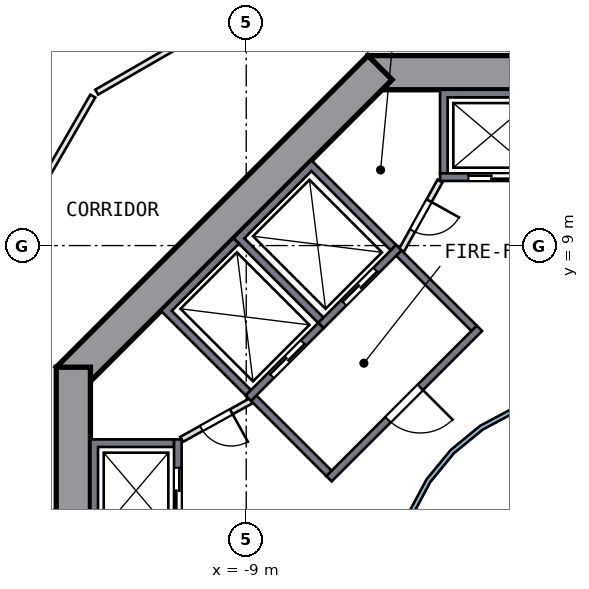
"""IFC4 building model, lengths in metres.
Left out: names, types, materials, properties, quantities, classifications, styles, units other than length and angle.
Written with IfcOpenShell. Run it as: python <this file> out.ifc"""

import sys

from ifc_helpers import new_model, si_unit, direction, frame, frame_2d, origin, place, context, subcontext, project, spatial, polyline, rectangle, outline, extrude, element, fill, save


model = new_model("IFC4")
c1 = context("Model", 3, precision=1e-05, world=origin(), true_north=direction((0.0, 1.0)))
c2 = subcontext(c1, "Body", "Model", "MODEL_VIEW")
j1 = project(units=[si_unit("LENGTHUNIT", "METRE"), si_unit("PLANEANGLEUNIT", "RADIAN")], contexts=[c1])
p1 = place(None, origin())
s1 = spatial("IfcSite", under=j1, at=p1, CompositionType="ELEMENT")
p2 = place(p1, origin())
s2 = spatial("IfcBuilding", under=s1, at=p2, CompositionType="ELEMENT")
p3 = place(p2, frame((0.0, 0.0, 8.0)))
s3 = spatial("IfcBuildingStorey", under=s2, at=p3, CompositionType="ELEMENT", Elevation=8.0)
p4 = place(p3, frame((5.799, 13.55, 0.0), z_axis=(0.0, 0.0, 1.0), x_axis=(-1.0, 0.0, 0.0)))
e1 = element("IfcWall", 1, at=p4, inside=s3, PredefinedType="SHEAR", context=c2, shape_type="SweptSolid", body=[
    extrude(rectangle(XDim=11.598, YDim=0.9, at=frame_2d((5.799, 0.0))), origin(), (0.0, 0.0, 1.0), 6.0),
])
p5 = place(p4, frame((4.899, 0.0, 0.0)))
e2 = element("IfcOpeningElement", 2, at=p5, cuts=e1, PredefinedType="OPENING", context=c2, shape_type="SweptSolid", body=[
    extrude(rectangle(XDim=1.8, YDim=2.1, at=frame_2d((0.9, 1.05))), frame((0.0, 0.46, 0.0), z_axis=(0.0, -1.0, 0.0), x_axis=(1.0, 0.0, 0.0)), (0.0, 0.0, 1.0), 0.92),
])
p6 = place(p3, frame((-5.481, 13.682, 0.0), z_axis=(0.0, 0.0, 1.0), x_axis=(-0.707106781, -0.707106781, 0.0)))
e3 = element("IfcWall", 3, at=p6, inside=s3, PredefinedType="SHEAR", context=c2, shape_type="SweptSolid", body=[
    extrude(rectangle(XDim=11.598, YDim=0.9, at=frame_2d((5.799, 0.0))), origin(), (0.0, 0.0, 1.0), 6.0),
])
p7 = place(p3, frame((-13.55, 5.799, 0.0), z_axis=(0.0, 0.0, 1.0), x_axis=(0.0, -1.0, 0.0)))
e4 = element("IfcWall", 4, at=p7, inside=s3, PredefinedType="SHEAR", context=c2, shape_type="SweptSolid", body=[
    extrude(rectangle(XDim=11.598, YDim=0.9, at=frame_2d((5.799, 0.0))), origin(), (0.0, 0.0, 1.0), 6.0),
])
p8 = place(p7, frame((4.899, 0.0, 0.0)))
e5 = element("IfcOpeningElement", 5, at=p8, cuts=e4, PredefinedType="OPENING", context=c2, shape_type="SweptSolid", body=[
    extrude(rectangle(XDim=1.8, YDim=2.1, at=frame_2d((0.9, 1.05))), frame((0.0, 0.46, 0.0), z_axis=(0.0, -1.0, 0.0), x_axis=(1.0, 0.0, 0.0)), (0.0, 0.0, 1.0), 0.92),
])
p9 = place(p3, origin())
e6 = element("IfcWall", 6, at=p9, inside=s3, PredefinedType="SOLIDWALL", context=c2, shape_type="SweptSolid", body=[
    extrude(outline(polyline([(-3.9, 10.9), (-3.9, 13.1), (-1.2, 13.1), (-1.2, 10.9), (-1.4, 10.9), (-1.4, 12.9), (-3.7, 12.9), (-3.7, 10.9), (-3.9, 10.9)])), origin(), (0.0, 0.0, 1.0), 5.55),
])
p10 = place(p3, frame((-1.2, 10.8, 0.0), z_axis=(0.0, 0.0, 1.0), x_axis=(-1.0, 0.0, 0.0)))
e7 = element("IfcWall", 7, at=p10, inside=s3, PredefinedType="SOLIDWALL", context=c2, shape_type="SweptSolid", body=[
    extrude(rectangle(XDim=2.7, YDim=0.2, at=frame_2d((1.35, 0.0))), origin(), (0.0, 0.0, 1.0), 5.55),
])
p11 = place(p10, frame((0.75, 0.0, 0.0)))
e8 = element("IfcOpeningElement", 8, at=p11, cuts=e7, PredefinedType="OPENING", context=c2, shape_type="SweptSolid", body=[
    extrude(rectangle(XDim=1.2, YDim=2.1, at=frame_2d((0.6, 1.05))), frame((0.0, 0.11, 0.0), z_axis=(0.0, -1.0, 0.0), x_axis=(1.0, 0.0, 0.0)), (0.0, 0.0, 1.0), 0.22),
])
p12 = place(p3, origin())
e9 = element("IfcWall", 9, at=p12, inside=s3, PredefinedType="SOLIDWALL", context=c2, shape_type="SweptSolid", body=[
    extrude(outline(polyline([(-13.1, 3.9), (-10.9, 3.9), (-10.9, 3.7), (-12.9, 3.7), (-12.9, 1.4), (-10.9, 1.4), (-10.9, 1.2), (-13.1, 1.2), (-13.1, 3.9)])), origin(), (0.0, 0.0, 1.0), 5.55),
])
p13 = place(p3, frame((-10.8, 1.2, 0.0), z_axis=(0.0, 0.0, 1.0), x_axis=(0.0, 1.0, 0.0)))
e10 = element("IfcWall", 10, at=p13, inside=s3, PredefinedType="SOLIDWALL", context=c2, shape_type="SweptSolid", body=[
    extrude(rectangle(XDim=2.7, YDim=0.2, at=frame_2d((1.35, 0.0))), origin(), (0.0, 0.0, 1.0), 5.55),
])
p14 = place(p13, frame((0.75, 0.0, 0.0)))
e11 = element("IfcOpeningElement", 11, at=p14, cuts=e10, PredefinedType="OPENING", context=c2, shape_type="SweptSolid", body=[
    extrude(rectangle(XDim=1.2, YDim=2.1, at=frame_2d((0.6, 1.05))), frame((0.0, 0.11, 0.0), z_axis=(0.0, -1.0, 0.0), x_axis=(1.0, 0.0, 0.0)), (0.0, 0.0, 1.0), 0.22),
])
p15 = place(p3, origin())
e12 = element("IfcWall", 12, at=p15, inside=s3, PredefinedType="SOLIDWALL", context=c2, shape_type="SweptSolid", body=[
    extrude(outline(polyline([(-9.334, 9.192), (-7.283, 11.243), (-5.056, 9.016), (-5.197, 8.874), (-7.283, 10.96), (-9.051, 9.192), (-6.965, 7.106), (-7.106, 6.965), (-9.334, 9.192)])), origin(), (0.0, 0.0, 1.0), 5.55),
])
p16 = place(p3, frame((-4.985, 8.945, 0.0), z_axis=(0.0, 0.0, 1.0), x_axis=(-0.707106781, -0.707106781, 0.0)))
e13 = element("IfcWall", 13, at=p16, inside=s3, PredefinedType="SOLIDWALL", context=c2, shape_type="SweptSolid", body=[
    extrude(rectangle(XDim=2.9, YDim=0.2, at=frame_2d((1.45, 0.0))), origin(), (0.0, 0.0, 1.0), 5.55),
])
p17 = place(p16, frame((0.85, 0.0, 0.0)))
e14 = element("IfcOpeningElement", 14, at=p17, cuts=e13, PredefinedType="OPENING", context=c2, shape_type="SweptSolid", body=[
    extrude(rectangle(XDim=1.2, YDim=2.1, at=frame_2d((0.6, 1.05))), frame((0.0, 0.11, 0.0), z_axis=(0.0, -1.0, 0.0), x_axis=(1.0, 0.0, 0.0)), (0.0, 0.0, 1.0), 0.22),
])
p18 = place(p3, origin())
e15 = element("IfcWall", 15, at=p18, inside=s3, PredefinedType="SOLIDWALL", context=c2, shape_type="SweptSolid", body=[
    extrude(outline(polyline([(-11.243, 7.283), (-9.334, 9.192), (-9.192, 9.051), (-10.96, 7.283), (-8.874, 5.197), (-9.016, 5.056), (-11.243, 7.283)])), origin(), (0.0, 0.0, 1.0), 5.55),
])
p19 = place(p3, frame((-7.036, 6.894, 0.0), z_axis=(0.0, 0.0, 1.0), x_axis=(-0.707106781, -0.707106781, 0.0)))
e16 = element("IfcWall", 16, at=p19, inside=s3, PredefinedType="SOLIDWALL", context=c2, shape_type="SweptSolid", body=[
    extrude(rectangle(XDim=2.7, YDim=0.2, at=frame_2d((1.35, 0.0))), origin(), (0.0, 0.0, 1.0), 5.55),
])
p20 = place(p19, frame((0.65, 0.0, 0.0)))
e17 = element("IfcOpeningElement", 17, at=p20, cuts=e16, PredefinedType="OPENING", context=c2, shape_type="SweptSolid", body=[
    extrude(rectangle(XDim=1.2, YDim=2.1, at=frame_2d((0.6, 1.05))), frame((0.0, 0.11, 0.0), z_axis=(0.0, -1.0, 0.0), x_axis=(1.0, 0.0, 0.0)), (0.0, 0.0, 1.0), 0.22),
])
p21 = place(p3, frame((-2.864, 6.823, 0.0), z_axis=(0.0, 0.0, 1.0), x_axis=(-0.707106781, -0.707106781, 0.0)))
e18 = element("IfcWall", 18, at=p21, inside=s3, PredefinedType="SOLIDWALL", context=c2, shape_type="SweptSolid", body=[
    extrude(rectangle(XDim=5.6, YDim=0.2, at=frame_2d((2.8, 0.0))), origin(), (0.0, 0.0, 1.0), 5.55),
])
p22 = place(p21, frame((2.2, 0.0, 0.0)))
e19 = element("IfcOpeningElement", 19, at=p22, cuts=e18, PredefinedType="OPENING", context=c2, shape_type="SweptSolid", body=[
    extrude(rectangle(XDim=1.2, YDim=2.1, at=frame_2d((0.6, 1.05))), frame((0.0, 0.11, 0.0), z_axis=(0.0, -1.0, 0.0), x_axis=(1.0, 0.0, 0.0)), (0.0, 0.0, 1.0), 0.22),
])
for number, where, z_axis, x_axis in (
    (20, (-3.005, 6.823, 0.0), (0.0, 0.0, 1.0), (-0.707, 0.707, 0.0)),
    (21, (-6.823, 3.005, 0.0), (0.0, 0.0, 1.0), (-0.707, 0.707, 0.0)),
):
    element("IfcWall", number, at=place(p3, frame(where, z_axis=z_axis, x_axis=x_axis)), inside=s3, PredefinedType="SOLIDWALL", context=c2, shape_type="SweptSolid", body=[
        extrude(rectangle(XDim=2.8, YDim=0.2, at=frame_2d((1.4, 0.0))), origin(), (0.0, 0.0, 1.0), 5.55),
    ])
p23 = place(p3, frame((-3.9, 10.7, 0.0), z_axis=(0.0, 0.0, 1.0), x_axis=(-0.485692555, -0.874129705, 0.0)))
e22 = element("IfcWall", 22, at=p23, inside=s3, PredefinedType="PARTITIONING", context=c2, shape_type="SweptSolid", body=[
    extrude(rectangle(XDim=2.089, YDim=0.15, at=frame_2d((1.044, 0.0))), origin(), (0.0, 0.0, 1.0), 5.55),
])
p24 = place(p23, frame((0.594, 0.0, 0.0)))
e23 = element("IfcOpeningElement", 23, at=p24, cuts=e22, PredefinedType="OPENING", context=c2, shape_type="SweptSolid", body=[
    extrude(rectangle(XDim=0.9, YDim=2.1, at=frame_2d((0.45, 1.05))), frame((0.0, 0.085, 0.0), z_axis=(0.0, -1.0, 0.0), x_axis=(1.0, 0.0, 0.0)), (0.0, 0.0, 1.0), 0.17),
])
p25 = place(p3, frame((-8.874, 4.914, 0.0), z_axis=(0.0, 0.0, 1.0), x_axis=(-0.874129705, -0.485692555, 0.0)))
e24 = element("IfcWall", 24, at=p25, inside=s3, PredefinedType="PARTITIONING", context=c2, shape_type="SweptSolid", body=[
    extrude(rectangle(XDim=2.089, YDim=0.15, at=frame_2d((1.044, 0.0))), origin(), (0.0, 0.0, 1.0), 5.55),
])
p26 = place(p25, frame((0.594, 0.0, 0.0)))
e25 = element("IfcOpeningElement", 25, at=p26, cuts=e24, PredefinedType="OPENING", context=c2, shape_type="SweptSolid", body=[
    extrude(rectangle(XDim=0.9, YDim=2.1, at=frame_2d((0.45, 1.05))), frame((0.0, 0.085, 0.0), z_axis=(0.0, -1.0, 0.0), x_axis=(1.0, 0.0, 0.0)), (0.0, 0.0, 1.0), 0.17),
])
p27 = place(p3, origin())
e26 = element("IfcWall", 26, at=p27, inside=s3, PredefinedType="SOLIDWALL", context=c2, shape_type="SweptSolid", body=[
    extrude(outline(polyline([(5.021, -0.999), (4.73, -1.959), (4.257, -2.844), (3.62, -3.62), (2.844, -4.257), (1.959, -4.73), (0.999, -5.021), (0.0, -5.12), (-0.999, -5.021), (-1.959, -4.73), (-2.844, -4.257), (-3.62, -3.62), (-4.257, -2.844), (-4.73, -1.959), (-5.021, -0.999), (-5.12, 0.0), (-5.021, 0.999), (-4.73, 1.959), (-4.257, 2.844), (-3.62, 3.62), (-2.844, 4.257), (-1.959, 4.73), (-0.999, 5.021), (0.0, 5.12), (0.999, 5.021), (1.959, 4.73), (2.844, 4.257), (3.62, 3.62), (4.257, 2.844), (4.73, 1.959), (5.021, 0.999), (5.12, 0.0), (5.021, -0.999)]), holes=[polyline([(4.904, 0.976), (4.619, 1.913), (4.157, 2.778), (3.535, 3.535), (2.778, 4.157), (1.913, 4.619), (0.976, 4.904), (0.0, 5.0), (-0.976, 4.904), (-1.913, 4.619), (-2.778, 4.157), (-3.535, 3.535), (-4.157, 2.778), (-4.619, 1.913), (-4.904, 0.976), (-5.0, 0.0), (-4.904, -0.976), (-4.619, -1.913), (-4.157, -2.778), (-3.535, -3.535), (-2.778, -4.157), (-1.913, -4.619), (-0.976, -4.904), (0.0, -5.0), (0.976, -4.904), (1.913, -4.619), (2.778, -4.157), (3.535, -3.535), (4.157, -2.778), (4.619, -1.913), (4.904, -0.976), (5.0, 0.0), (4.904, 0.976)])]), origin(), (0.0, 0.0, 1.0), 5.55),
])
p28 = place(p3, frame((-17.721, 4.823, 0.0), z_axis=(0.0, 0.0, 1.0), x_axis=(0.499979668, 0.866037142, 0.0)))
e27 = element("IfcWall", 27, at=p28, inside=s3, PredefinedType="PARTITIONING", context=c2, shape_type="SweptSolid", body=[
    extrude(rectangle(XDim=9.367, YDim=0.15, at=frame_2d((4.683, 0.0))), origin(), (0.0, 0.0, 1.0), 5.55),
])
p29 = place(p3, frame((-4.845, 17.708, 0.0), z_axis=(0.0, 0.0, 1.0), x_axis=(-0.866032826, -0.499987144, 0.0)))
e28 = element("IfcWall", 28, at=p29, inside=s3, PredefinedType="PARTITIONING", context=c2, shape_type="SweptSolid", body=[
    extrude(rectangle(XDim=9.342, YDim=0.15, at=frame_2d((4.671, 0.0))), origin(), (0.0, 0.0, 1.0), 5.55),
])
p30 = place(p29, frame((3.792, 0.0, 0.0)))
e29 = element("IfcOpeningElement", 29, at=p30, cuts=e28, PredefinedType="OPENING", context=c2, shape_type="SweptSolid", body=[
    extrude(rectangle(XDim=1.8, YDim=2.1, at=frame_2d((0.9, 1.05))), frame((0.0, 0.085, 0.0), z_axis=(0.0, -1.0, 0.0), x_axis=(1.0, 0.0, 0.0)), (0.0, 0.0, 1.0), 0.17),
])
p31 = place(p11, origin())
e30 = element("IfcDoor", 30, at=p31, inside=s3, OperationType="DOUBLE_DOOR_SLIDING", PredefinedType="DOOR", context=c2, shape_type="SweptSolid", body=[
    extrude(rectangle(XDim=1.2, YDim=2.1, at=frame_2d((0.6, 1.05))), frame((0.0, 0.025, 0.0), z_axis=(0.0, -1.0, 0.0), x_axis=(1.0, 0.0, 0.0)), (0.0, 0.0, 1.0), 0.05),
])
fill(e8, e30)
p32 = place(p14, origin())
e31 = element("IfcDoor", 31, at=p32, inside=s3, OperationType="DOUBLE_DOOR_SLIDING", PredefinedType="DOOR", context=c2, shape_type="SweptSolid", body=[
    extrude(rectangle(XDim=1.2, YDim=2.1, at=frame_2d((0.6, 1.05))), frame((0.0, 0.025, 0.0), z_axis=(0.0, -1.0, 0.0), x_axis=(1.0, 0.0, 0.0)), (0.0, 0.0, 1.0), 0.05),
])
fill(e11, e31)
p33 = place(p17, origin())
e32 = element("IfcDoor", 32, at=p33, inside=s3, OperationType="DOUBLE_DOOR_SLIDING", PredefinedType="DOOR", context=c2, shape_type="SweptSolid", body=[
    extrude(rectangle(XDim=1.2, YDim=2.1, at=frame_2d((0.6, 1.05))), frame((0.0, 0.025, 0.0), z_axis=(0.0, -1.0, 0.0), x_axis=(1.0, 0.0, 0.0)), (0.0, 0.0, 1.0), 0.05),
])
fill(e14, e32)
p34 = place(p20, origin())
e33 = element("IfcDoor", 33, at=p34, inside=s3, OperationType="DOUBLE_DOOR_SLIDING", PredefinedType="DOOR", context=c2, shape_type="SweptSolid", body=[
    extrude(rectangle(XDim=1.2, YDim=2.1, at=frame_2d((0.6, 1.05))), frame((0.0, 0.025, 0.0), z_axis=(0.0, -1.0, 0.0), x_axis=(1.0, 0.0, 0.0)), (0.0, 0.0, 1.0), 0.05),
])
fill(e17, e33)
p35 = place(p22, origin())
e34 = element("IfcDoor", 34, at=p35, inside=s3, OperationType="SINGLE_SWING_LEFT", PredefinedType="DOOR", context=c2, shape_type="SweptSolid", body=[
    extrude(rectangle(XDim=1.2, YDim=2.1, at=frame_2d((0.6, 1.05))), frame((0.0, 0.025, 0.0), z_axis=(0.0, -1.0, 0.0), x_axis=(1.0, 0.0, 0.0)), (0.0, 0.0, 1.0), 0.05),
])
fill(e19, e34)
p36 = place(p24, origin())
e35 = element("IfcDoor", 35, at=p36, inside=s3, OperationType="SINGLE_SWING_LEFT", PredefinedType="DOOR", context=c2, shape_type="SweptSolid", body=[
    extrude(rectangle(XDim=0.9, YDim=2.1, at=frame_2d((0.45, 1.05))), frame((0.0, 0.025, 0.0), z_axis=(0.0, -1.0, 0.0), x_axis=(1.0, 0.0, 0.0)), (0.0, 0.0, 1.0), 0.05),
])
fill(e23, e35)
p37 = place(p26, origin())
e36 = element("IfcDoor", 36, at=p37, inside=s3, OperationType="SINGLE_SWING_LEFT", PredefinedType="DOOR", context=c2, shape_type="SweptSolid", body=[
    extrude(rectangle(XDim=0.9, YDim=2.1, at=frame_2d((0.45, 1.05))), frame((0.0, 0.025, 0.0), z_axis=(0.0, -1.0, 0.0), x_axis=(1.0, 0.0, 0.0)), (0.0, 0.0, 1.0), 0.05),
])
fill(e25, e36)
save(model, sys.argv[1])
